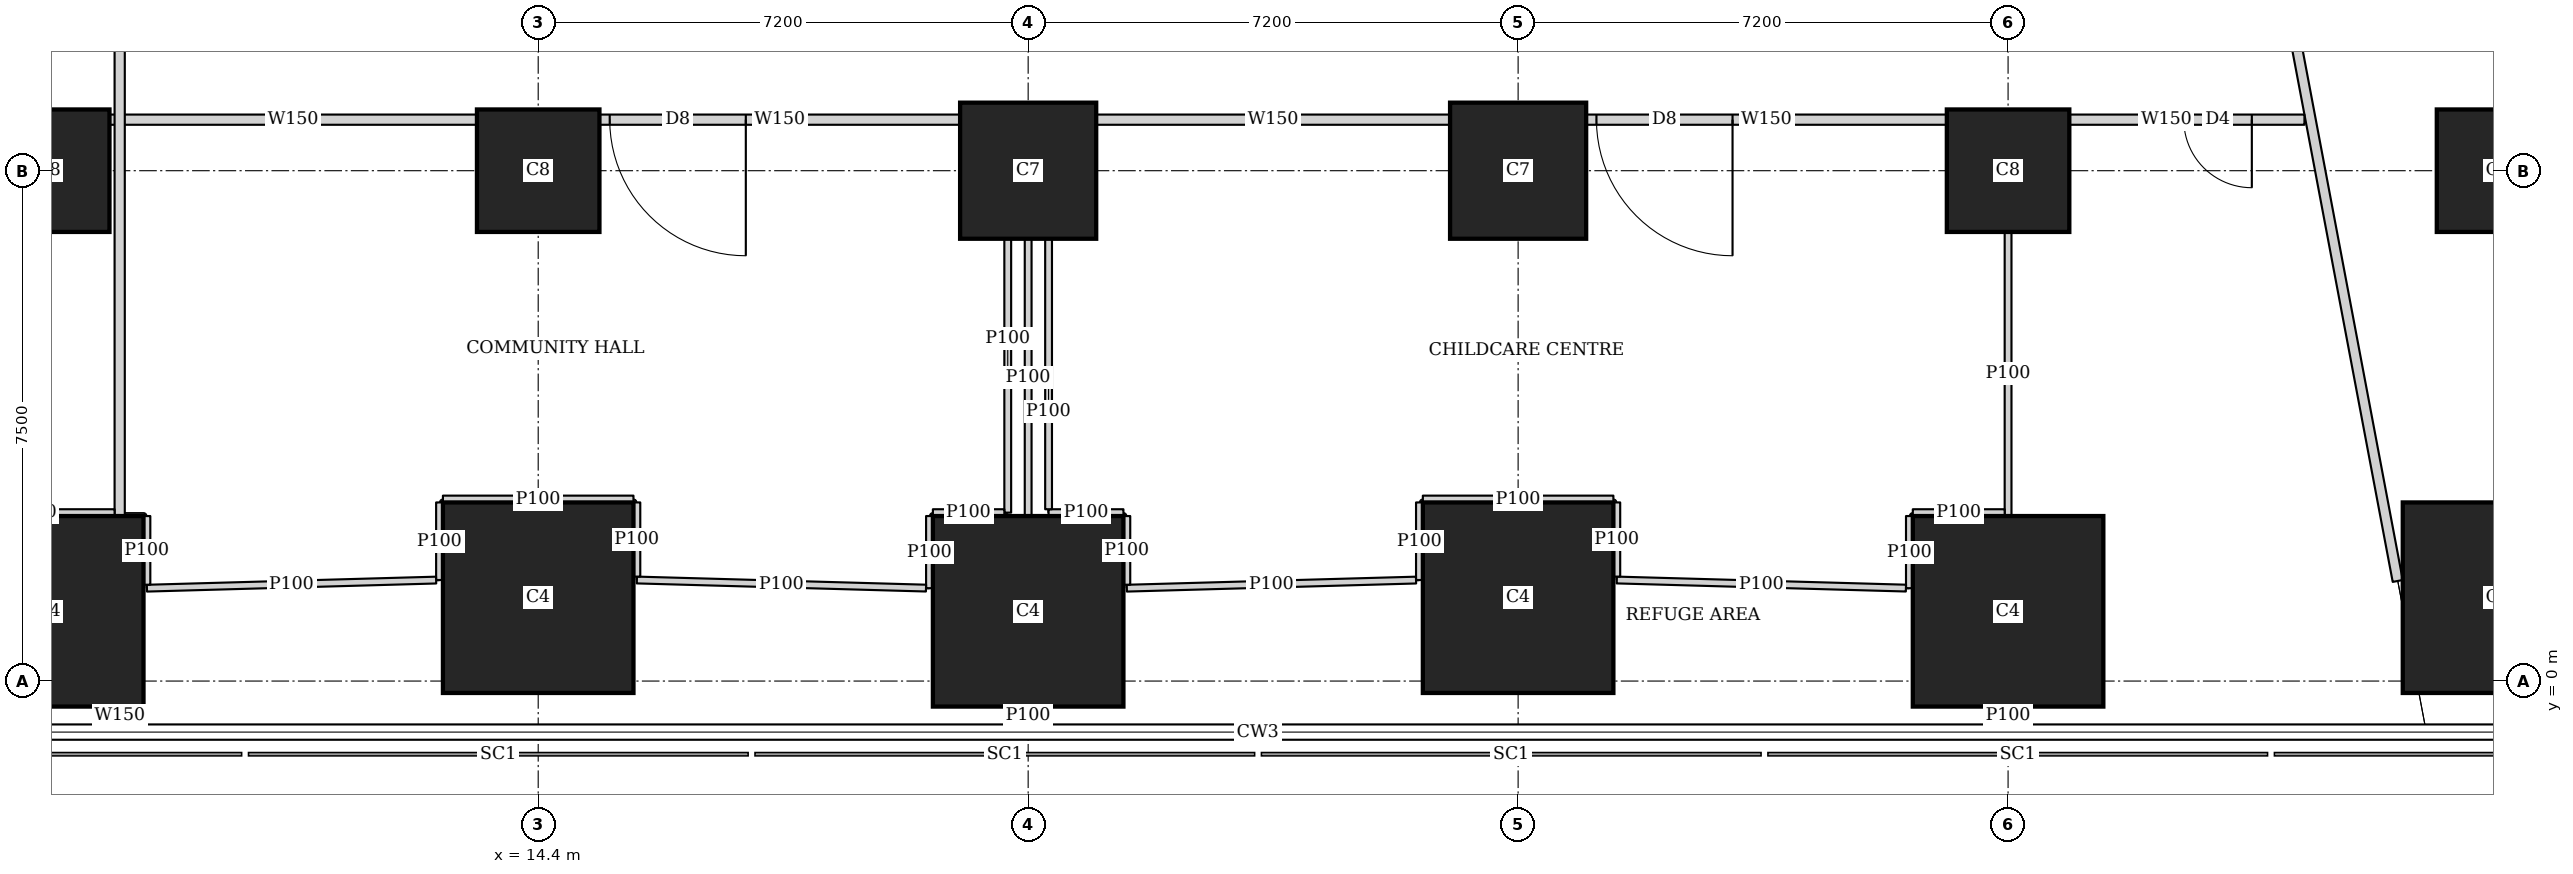
"""IFC4 building model, lengths in metres.
Left out: names, types, materials, properties, quantities, classifications, styles, units other than length and angle.
Written with IfcOpenShell. Run it as: python <this file> out.ifc"""

import sys

from ifc_helpers import new_model, si_unit, direction, frame, frame_2d, origin, origin_2d, place, context, subcontext, project, spatial, rectangle, extrude, element, fill, save


model = new_model("IFC4")
c1 = context("Model", 3, precision=1e-05, world=origin(), true_north=direction((0.0, 1.0)))
c2 = subcontext(c1, "Body", "Model", "MODEL_VIEW")
j1 = project(units=[si_unit("LENGTHUNIT", "METRE"), si_unit("PLANEANGLEUNIT", "RADIAN")], contexts=[c1])
p1 = place(None, origin())
s1 = spatial("IfcSite", under=j1, at=p1, CompositionType="ELEMENT")
p2 = place(p1, origin())
s2 = spatial("IfcBuilding", under=s1, at=p2, CompositionType="ELEMENT")
p3 = place(p2, frame((0.0, 0.0, 72.5)))
s3 = spatial("IfcBuildingStorey", under=s2, at=p3, CompositionType="ELEMENT", Elevation=72.5)
for number, where, z_axis, x_axis in (
    (1, (7.2, 1.025, 0.0), (0.0, 0.0, 1.0), (1.0, 0.0, 0.0)),
    (2, (14.4, 1.225, 0.0), (0.0, 0.0, 1.0), (1.0, 0.0, 0.0)),
    (3, (21.6, 1.025, 0.0), (0.0, 0.0, 1.0), (1.0, 0.0, 0.0)),
    (4, (28.8, 1.225, 0.0), (0.0, 0.0, 1.0), (1.0, 0.0, 0.0)),
    (5, (36.0, 1.025, 0.0), (0.0, 0.0, 1.0), (1.0, 0.0, 0.0)),
    (6, (43.2, 1.225, 0.0), (0.0, 0.0, 1.0), (1.0, 0.0, 0.0)),
):
    element("IfcColumn", number, at=place(p3, frame(where, z_axis=z_axis, x_axis=x_axis)), inside=s3, PredefinedType="COLUMN", context=c2, shape_type="SweptSolid", body=[
        extrude(rectangle(XDim=2.8, YDim=2.8, at=origin_2d()), origin(), (0.0, 0.0, 1.0), 5.4),
    ])
for number, where, z_axis, x_axis in (
    (7, (7.2, 7.5, 0.0), (0.0, 0.0, 1.0), (1.0, 0.0, 0.0)),
    (8, (14.4, 7.5, 0.0), (0.0, 0.0, 1.0), (1.0, 0.0, 0.0)),
):
    element("IfcColumn", number, at=place(p3, frame(where, z_axis=z_axis, x_axis=x_axis)), inside=s3, PredefinedType="COLUMN", context=c2, shape_type="SweptSolid", body=[
        extrude(rectangle(XDim=1.8, YDim=1.8, at=origin_2d()), origin(), (0.0, 0.0, 1.0), 5.4),
    ])
for number, where, z_axis, x_axis in (
    (9, (21.6, 7.5, 0.0), (0.0, 0.0, 1.0), (1.0, 0.0, 0.0)),
    (10, (28.8, 7.5, 0.0), (0.0, 0.0, 1.0), (1.0, 0.0, 0.0)),
):
    element("IfcColumn", number, at=place(p3, frame(where, z_axis=z_axis, x_axis=x_axis)), inside=s3, PredefinedType="COLUMN", context=c2, shape_type="SweptSolid", body=[
        extrude(rectangle(XDim=2.0, YDim=2.0, at=origin_2d()), origin(), (0.0, 0.0, 1.0), 5.4),
    ])
for number, where, z_axis, x_axis in (
    (11, (36.0, 7.5, 0.0), (0.0, 0.0, 1.0), (1.0, 0.0, 0.0)),
    (12, (43.2, 7.5, 0.0), (0.0, 0.0, 1.0), (1.0, 0.0, 0.0)),
):
    element("IfcColumn", number, at=place(p3, frame(where, z_axis=z_axis, x_axis=x_axis)), inside=s3, PredefinedType="COLUMN", context=c2, shape_type="SweptSolid", body=[
        extrude(rectangle(XDim=1.8, YDim=1.8, at=origin_2d()), origin(), (0.0, 0.0, 1.0), 5.4),
    ])
p4 = place(p3, frame((8.25, -0.637, 0.0), z_axis=(0.0, 0.0, 1.0), x_axis=(0.0, 1.0, 0.0)))
e13 = element("IfcWall", 13, at=p4, inside=s3, PredefinedType="SOLIDWALL", context=c2, shape_type="SweptSolid", body=[
    extrude(rectangle(XDim=0.261, YDim=0.15, at=frame_2d((0.13, 0.0))), origin(), (0.0, 0.0, 1.0), 5.15),
])
p5 = place(p3, frame((8.25, 2.426, 0.0), z_axis=(0.0, 0.0, 1.0), x_axis=(0.0, 1.0, 0.0)))
e14 = element("IfcWall", 14, at=p5, inside=s3, PredefinedType="SOLIDWALL", context=c2, shape_type="SweptSolid", body=[
    extrude(rectangle(XDim=40.173, YDim=0.15, at=frame_2d((20.086, 0.0))), origin(), (0.0, 0.0, 1.0), 3.55),
])
p6 = place(p5, frame((7.399, 0.0, 0.0)))
e15 = element("IfcOpeningElement", 15, at=p6, cuts=e14, PredefinedType="OPENING", context=c2, shape_type="SweptSolid", body=[
    extrude(rectangle(XDim=2.0, YDim=2.1, at=frame_2d((1.0, 1.05))), frame((0.0, 0.085, 0.0), z_axis=(0.0, -1.0, 0.0), x_axis=(1.0, 0.0, 0.0)), (0.0, 0.0, 1.0), 0.17),
])
p7 = place(p5, frame((31.249, 0.0, 0.0)))
e16 = element("IfcOpeningElement", 16, at=p7, cuts=e14, PredefinedType="OPENING", context=c2, shape_type="SweptSolid", body=[
    extrude(rectangle(XDim=1.0, YDim=2.1, at=frame_2d((0.5, 1.05))), frame((0.0, 0.085, 0.0), z_axis=(0.0, -1.0, 0.0), x_axis=(1.0, 0.0, 0.0)), (0.0, 0.0, 1.0), 0.17),
])
p8 = place(p3, frame((40.355, 8.25, 0.0), z_axis=(0.0, 0.0, 1.0), x_axis=(-1.0, 0.0, 0.0)))
e17 = element("IfcWall", 17, at=p8, inside=s3, PredefinedType="SOLIDWALL", context=c2, shape_type="SweptSolid", body=[
    extrude(rectangle(XDim=3.454, YDim=0.15, at=frame_2d((1.727, 0.0))), origin(), (0.0, 0.0, 1.0), 3.55),
])
p9 = place(p8, frame((0.773, 0.0, 0.0)))
e18 = element("IfcOpeningElement", 18, at=p9, cuts=e17, PredefinedType="OPENING", context=c2, shape_type="SweptSolid", body=[
    extrude(rectangle(XDim=1.0, YDim=2.1, at=frame_2d((0.5, 1.05))), frame((0.0, 0.085, 0.0), z_axis=(0.0, -1.0, 0.0), x_axis=(1.0, 0.0, 0.0)), (0.0, 0.0, 1.0), 0.17),
])
p10 = place(p3, frame((35.099, 8.25, 0.0), z_axis=(0.0, 0.0, 1.0), x_axis=(-1.0, 0.0, 0.0)))
e19 = element("IfcWall", 19, at=p10, inside=s3, PredefinedType="SOLIDWALL", context=c2, shape_type="SweptSolid", body=[
    extrude(rectangle(XDim=5.298, YDim=0.15, at=frame_2d((2.649, 0.0))), origin(), (0.0, 0.0, 1.0), 3.15),
])
p11 = place(p10, frame((3.148, 0.0, 0.0)))
e20 = element("IfcOpeningElement", 20, at=p11, cuts=e19, PredefinedType="OPENING", context=c2, shape_type="SweptSolid", body=[
    extrude(rectangle(XDim=2.0, YDim=2.1, at=frame_2d((1.0, 1.05))), frame((0.0, 0.085, 0.0), z_axis=(0.0, -1.0, 0.0), x_axis=(1.0, 0.0, 0.0)), (0.0, 0.0, 1.0), 0.17),
])
p12 = place(p3, frame((27.799, 8.25, 0.0), z_axis=(0.0, 0.0, 1.0), x_axis=(-1.0, 0.0, 0.0)))
e21 = element("IfcWall", 21, at=p12, inside=s3, PredefinedType="SOLIDWALL", context=c2, shape_type="SweptSolid", body=[
    extrude(rectangle(XDim=5.198, YDim=0.15, at=frame_2d((2.599, 0.0))), origin(), (0.0, 0.0, 1.0), 3.15),
])
p13 = place(p3, frame((20.599, 8.25, 0.0), z_axis=(0.0, 0.0, 1.0), x_axis=(-1.0, 0.0, 0.0)))
e22 = element("IfcWall", 22, at=p13, inside=s3, PredefinedType="SOLIDWALL", context=c2, shape_type="SweptSolid", body=[
    extrude(rectangle(XDim=5.298, YDim=0.15, at=frame_2d((2.649, 0.0))), origin(), (0.0, 0.0, 1.0), 3.15),
])
p14 = place(p13, frame((3.148, 0.0, 0.0)))
e23 = element("IfcOpeningElement", 23, at=p14, cuts=e22, PredefinedType="OPENING", context=c2, shape_type="SweptSolid", body=[
    extrude(rectangle(XDim=2.0, YDim=2.1, at=frame_2d((1.0, 1.05))), frame((0.0, 0.085, 0.0), z_axis=(0.0, -1.0, 0.0), x_axis=(1.0, 0.0, 0.0)), (0.0, 0.0, 1.0), 0.17),
])
p15 = place(p3, frame((13.499, 8.25, 0.0), z_axis=(0.0, 0.0, 1.0), x_axis=(-1.0, 0.0, 0.0)))
e24 = element("IfcWall", 24, at=p15, inside=s3, PredefinedType="SOLIDWALL", context=c2, shape_type="SweptSolid", body=[
    extrude(rectangle(XDim=5.399, YDim=0.15, at=frame_2d((2.699, 0.0))), origin(), (0.0, 0.0, 1.0), 3.55),
])
p16 = place(p3, frame((35.094, 36.585, 0.0), z_axis=(0.0, 0.0, 1.0), x_axis=(0.185591455861, -0.982626995106, 0.0)))
e25 = element("IfcWall", 25, at=p16, inside=s3, PredefinedType="SOLIDWALL", context=c2, shape_type="SweptSolid", body=[
    extrude(rectangle(XDim=35.735, YDim=0.15, at=frame_2d((17.867, 0.0))), origin(), (0.0, 0.0, 1.0), 3.35),
])
p17 = place(p16, frame((15.15, 0.0, 0.0)))
e26 = element("IfcOpeningElement", 26, at=p17, cuts=e25, PredefinedType="OPENING", context=c2, shape_type="SweptSolid", body=[
    extrude(rectangle(XDim=1.0, YDim=2.1, at=frame_2d((0.5, 1.05))), frame((0.0, 0.085, 0.0), z_axis=(0.0, -1.0, 0.0), x_axis=(1.0, 0.0, 0.0)), (0.0, 0.0, 1.0), 0.17),
])
p18 = place(p3, frame((21.6, -0.637, 0.0), z_axis=(0.0, 0.0, 1.0), x_axis=(0.0, 1.0, 0.0)))
e27 = element("IfcWall", 27, at=p18, inside=s3, PredefinedType="PARTITIONING", context=c2, shape_type="SweptSolid", body=[
    extrude(rectangle(XDim=0.261, YDim=0.1, at=frame_2d((0.13, 0.0))), origin(), (0.0, 0.0, 1.0), 5.15),
])
p19 = place(p3, frame((21.6, 2.426, 0.0), z_axis=(0.0, 0.0, 1.0), x_axis=(0.0, 1.0, 0.0)))
e28 = element("IfcWall", 28, at=p19, inside=s3, PredefinedType="PARTITIONING", context=c2, shape_type="SweptSolid", body=[
    extrude(rectangle(XDim=4.073, YDim=0.1, at=frame_2d((2.037, 0.0))), origin(), (0.0, 0.0, 1.0), 3.55),
])
p20 = place(p3, frame((36.0, -0.637, 0.0), z_axis=(0.0, 0.0, 1.0), x_axis=(0.0, 1.0, 0.0)))
e29 = element("IfcWall", 29, at=p20, inside=s3, PredefinedType="PARTITIONING", context=c2, shape_type="SweptSolid", body=[
    extrude(rectangle(XDim=0.261, YDim=0.1, at=frame_2d((0.13, 0.0))), origin(), (0.0, 0.0, 1.0), 5.15),
])
p21 = place(p3, frame((36.0, 2.426, 0.0), z_axis=(0.0, 0.0, 1.0), x_axis=(0.0, 1.0, 0.0)))
e30 = element("IfcWall", 30, at=p21, inside=s3, PredefinedType="PARTITIONING", context=c2, shape_type="SweptSolid", body=[
    extrude(rectangle(XDim=4.173, YDim=0.1, at=frame_2d((2.086, 0.0))), origin(), (0.0, 0.0, 1.0), 3.55),
])
p22 = place(p3, frame((21.3, 6.499, 0.0), z_axis=(0.0, 0.0, 1.0), x_axis=(0.0, -1.0, 0.0)))
e31 = element("IfcWall", 31, at=p22, inside=s3, PredefinedType="PARTITIONING", context=c2, shape_type="SweptSolid", body=[
    extrude(rectangle(XDim=4.024, YDim=0.1, at=frame_2d((2.012, 0.0))), origin(), (0.0, 0.0, 1.0), 3.55),
])
p23 = place(p3, frame((21.25, 2.475, 0.0), z_axis=(0.0, 0.0, 1.0), x_axis=(-1.0, 0.0, 0.0)))
e32 = element("IfcWall", 32, at=p23, inside=s3, PredefinedType="PARTITIONING", context=c2, shape_type="SweptSolid", body=[
    extrude(rectangle(XDim=1.05, YDim=0.1, at=frame_2d((0.525, 0.0))), origin(), (0.0, 0.0, 1.0), 3.55),
])
p24 = place(p3, frame((20.15, 2.425, 0.0), z_axis=(0.0, 0.0, 1.0), x_axis=(0.0, -1.0, 0.0)))
e33 = element("IfcWall", 33, at=p24, inside=s3, PredefinedType="PARTITIONING", context=c2, shape_type="SweptSolid", body=[
    extrude(rectangle(XDim=1.06, YDim=0.1, at=frame_2d((0.53, 0.0))), origin(), (0.0, 0.0, 1.0), 3.35),
])
p25 = place(p3, frame((20.099, 1.366, 0.0), z_axis=(0.0, 0.0, 1.0), x_axis=(-0.999607123995, 0.028028515083, 0.0)))
e34 = element("IfcWall", 34, at=p25, inside=s3, PredefinedType="PARTITIONING", context=c2, shape_type="SweptSolid", body=[
    extrude(rectangle(XDim=4.251, YDim=0.1, at=frame_2d((2.125, 0.0))), origin(), (0.0, 0.0, 1.0), 3.35),
])
p26 = place(p3, frame((15.85, 1.535, 0.0), z_axis=(0.0, 0.0, 1.0), x_axis=(0.0, 1.0, 0.0)))
e35 = element("IfcWall", 35, at=p26, inside=s3, PredefinedType="PARTITIONING", context=c2, shape_type="SweptSolid", body=[
    extrude(rectangle(XDim=1.09, YDim=0.1, at=frame_2d((0.545, 0.0))), origin(), (0.0, 0.0, 1.0), 3.35),
])
p27 = place(p3, frame((15.8, 2.675, 0.0), z_axis=(0.0, 0.0, 1.0), x_axis=(-1.0, 0.0, 0.0)))
e36 = element("IfcWall", 36, at=p27, inside=s3, PredefinedType="PARTITIONING", context=c2, shape_type="SweptSolid", body=[
    extrude(rectangle(XDim=2.8, YDim=0.1, at=frame_2d((1.4, 0.0))), origin(), (0.0, 0.0, 1.0), 3.55),
])
p28 = place(p3, frame((12.95, 2.625, 0.0), z_axis=(0.0, 0.0, 1.0), x_axis=(0.0, -1.0, 0.0)))
e37 = element("IfcWall", 37, at=p28, inside=s3, PredefinedType="PARTITIONING", context=c2, shape_type="SweptSolid", body=[
    extrude(rectangle(XDim=1.14, YDim=0.1, at=frame_2d((0.57, 0.0))), origin(), (0.0, 0.0, 1.0), 3.35),
])
p29 = place(p3, frame((12.9, 1.484, 0.0), z_axis=(0.0, 0.0, 1.0), x_axis=(-0.999608911234, -0.027964702423, 0.0)))
e38 = element("IfcWall", 38, at=p29, inside=s3, PredefinedType="PARTITIONING", context=c2, shape_type="SweptSolid", body=[
    extrude(rectangle(XDim=4.252, YDim=0.1, at=frame_2d((2.126, 0.0))), origin(), (0.0, 0.0, 1.0), 3.35),
])
p30 = place(p3, frame((8.65, 1.416, 0.0), z_axis=(0.0, 0.0, 1.0), x_axis=(0.0, 1.0, 0.0)))
e39 = element("IfcWall", 39, at=p30, inside=s3, PredefinedType="PARTITIONING", context=c2, shape_type="SweptSolid", body=[
    extrude(rectangle(XDim=1.009, YDim=0.1, at=frame_2d((0.504, 0.0))), origin(), (0.0, 0.0, 1.0), 3.35),
])
p31 = place(p3, frame((35.95, 2.475, 0.0), z_axis=(0.0, 0.0, 1.0), x_axis=(-1.0, 0.0, 0.0)))
e40 = element("IfcWall", 40, at=p31, inside=s3, PredefinedType="PARTITIONING", context=c2, shape_type="SweptSolid", body=[
    extrude(rectangle(XDim=1.35, YDim=0.1, at=frame_2d((0.675, 0.0))), origin(), (0.0, 0.0, 1.0), 3.55),
])
p32 = place(p3, frame((34.55, 2.425, 0.0), z_axis=(0.0, 0.0, 1.0), x_axis=(0.0, -1.0, 0.0)))
e41 = element("IfcWall", 41, at=p32, inside=s3, PredefinedType="PARTITIONING", context=c2, shape_type="SweptSolid", body=[
    extrude(rectangle(XDim=1.06, YDim=0.1, at=frame_2d((0.53, 0.0))), origin(), (0.0, 0.0, 1.0), 3.35),
])
p33 = place(p3, frame((34.499, 1.366, 0.0), z_axis=(0.0, 0.0, 1.0), x_axis=(-0.999607123995, 0.028028515083, 0.0)))
e42 = element("IfcWall", 42, at=p33, inside=s3, PredefinedType="PARTITIONING", context=c2, shape_type="SweptSolid", body=[
    extrude(rectangle(XDim=4.251, YDim=0.1, at=frame_2d((2.125, 0.0))), origin(), (0.0, 0.0, 1.0), 3.35),
])
p34 = place(p3, frame((30.25, 1.535, 0.0), z_axis=(0.0, 0.0, 1.0), x_axis=(0.0, 1.0, 0.0)))
e43 = element("IfcWall", 43, at=p34, inside=s3, PredefinedType="PARTITIONING", context=c2, shape_type="SweptSolid", body=[
    extrude(rectangle(XDim=1.09, YDim=0.1, at=frame_2d((0.545, 0.0))), origin(), (0.0, 0.0, 1.0), 3.35),
])
p35 = place(p3, frame((30.2, 2.675, 0.0), z_axis=(0.0, 0.0, 1.0), x_axis=(-1.0, 0.0, 0.0)))
e44 = element("IfcWall", 44, at=p35, inside=s3, PredefinedType="PARTITIONING", context=c2, shape_type="SweptSolid", body=[
    extrude(rectangle(XDim=2.8, YDim=0.1, at=frame_2d((1.4, 0.0))), origin(), (0.0, 0.0, 1.0), 3.55),
])
p36 = place(p3, frame((27.35, 2.625, 0.0), z_axis=(0.0, 0.0, 1.0), x_axis=(0.0, -1.0, 0.0)))
e45 = element("IfcWall", 45, at=p36, inside=s3, PredefinedType="PARTITIONING", context=c2, shape_type="SweptSolid", body=[
    extrude(rectangle(XDim=1.14, YDim=0.1, at=frame_2d((0.57, 0.0))), origin(), (0.0, 0.0, 1.0), 3.35),
])
p37 = place(p3, frame((27.3, 1.484, 0.0), z_axis=(0.0, 0.0, 1.0), x_axis=(-0.999608911234, -0.027964702423, 0.0)))
e46 = element("IfcWall", 46, at=p37, inside=s3, PredefinedType="PARTITIONING", context=c2, shape_type="SweptSolid", body=[
    extrude(rectangle(XDim=4.252, YDim=0.1, at=frame_2d((2.126, 0.0))), origin(), (0.0, 0.0, 1.0), 3.35),
])
p38 = place(p3, frame((23.05, 1.416, 0.0), z_axis=(0.0, 0.0, 1.0), x_axis=(0.0, 1.0, 0.0)))
e47 = element("IfcWall", 47, at=p38, inside=s3, PredefinedType="PARTITIONING", context=c2, shape_type="SweptSolid", body=[
    extrude(rectangle(XDim=1.009, YDim=0.1, at=frame_2d((0.504, 0.0))), origin(), (0.0, 0.0, 1.0), 3.35),
])
p39 = place(p3, frame((23.0, 2.475, 0.0), z_axis=(0.0, 0.0, 1.0), x_axis=(-1.0, 0.0, 0.0)))
e48 = element("IfcWall", 48, at=p39, inside=s3, PredefinedType="PARTITIONING", context=c2, shape_type="SweptSolid", body=[
    extrude(rectangle(XDim=1.1, YDim=0.1, at=frame_2d((0.55, 0.0))), origin(), (0.0, 0.0, 1.0), 3.55),
])
p40 = place(p3, frame((21.9, 2.525, 0.0), z_axis=(0.0, 0.0, 1.0), x_axis=(0.0, 1.0, 0.0)))
e49 = element("IfcWall", 49, at=p40, inside=s3, PredefinedType="PARTITIONING", context=c2, shape_type="SweptSolid", body=[
    extrude(rectangle(XDim=3.974, YDim=0.1, at=frame_2d((1.987, 0.0))), origin(), (0.0, 0.0, 1.0), 3.55),
])
p41 = place(p3, frame((8.175, 2.475, 0.0), z_axis=(0.0, 0.0, 1.0), x_axis=(-1.0, 0.0, 0.0)))
e50 = element("IfcWall", 50, at=p41, inside=s3, PredefinedType="PARTITIONING", context=c2, shape_type="SweptSolid", body=[
    extrude(rectangle(XDim=2.375, YDim=0.1, at=frame_2d((1.188, 0.0))), origin(), (0.0, 0.0, 1.0), 3.35),
])
p42 = place(p14, origin())
e51 = element("IfcDoor", 51, at=p42, inside=s3, OperationType="DOUBLE_DOOR_SINGLE_SWING", PredefinedType="DOOR", context=c2, shape_type="SweptSolid", body=[
    extrude(rectangle(XDim=2.0, YDim=2.1, at=frame_2d((1.0, 1.05))), frame((0.0, 0.025, 0.0), z_axis=(0.0, -1.0, 0.0), x_axis=(1.0, 0.0, 0.0)), (0.0, 0.0, 1.0), 0.05),
])
fill(e23, e51)
p43 = place(p11, origin())
e52 = element("IfcDoor", 52, at=p43, inside=s3, OperationType="DOUBLE_DOOR_SINGLE_SWING", PredefinedType="DOOR", context=c2, shape_type="SweptSolid", body=[
    extrude(rectangle(XDim=2.0, YDim=2.1, at=frame_2d((1.0, 1.05))), frame((0.0, 0.025, 0.0), z_axis=(0.0, -1.0, 0.0), x_axis=(1.0, 0.0, 0.0)), (0.0, 0.0, 1.0), 0.05),
])
fill(e20, e52)
p44 = place(p9, origin())
e53 = element("IfcDoor", 53, at=p44, inside=s3, OperationType="SINGLE_SWING_LEFT", PredefinedType="DOOR", context=c2, shape_type="SweptSolid", body=[
    extrude(rectangle(XDim=1.0, YDim=2.1, at=frame_2d((0.5, 1.05))), frame((0.0, 0.025, 0.0), z_axis=(0.0, -1.0, 0.0), x_axis=(1.0, 0.0, 0.0)), (0.0, 0.0, 1.0), 0.05),
])
fill(e18, e53)
save(model, sys.argv[1])
